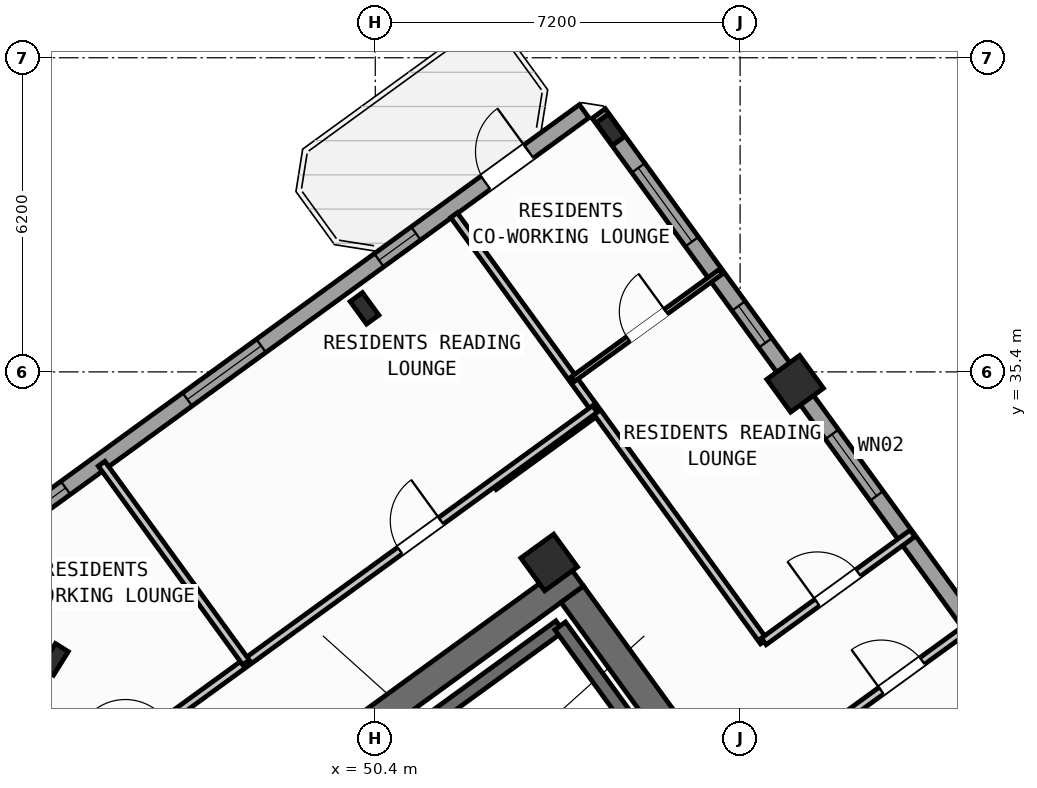
"""IFC4 building model, lengths in metres.
Left out: names, types, materials, properties, quantities, classifications, styles, units other than length and angle.
Written with IfcOpenShell. Run it as: python <this file> out.ifc"""

import sys

from ifc_helpers import new_model, si_unit, direction, frame, frame_2d, origin, origin_2d, place, context, subcontext, project, spatial, rectangle, hollow_rectangle, i_section, extrude, source, transform, mapped, element, fill, save


model = new_model("IFC4")
c1 = context("Model", 3, precision=1e-05, world=origin(), true_north=direction((0.0, 1.0)))
c2 = subcontext(c1, "Body", "Model", "MODEL_VIEW")
j1 = project(units=[si_unit("LENGTHUNIT", "METRE"), si_unit("PLANEANGLEUNIT", "RADIAN")], contexts=[c1])
p1 = place(None, origin())
s1 = spatial("IfcSite", under=j1, at=p1, CompositionType="ELEMENT")
p2 = place(p1, origin())
s2 = spatial("IfcBuilding", under=s1, at=p2, CompositionType="ELEMENT")
p3 = place(p2, frame((0.0, 0.0, 191.4)))
s3 = spatial("IfcBuildingStorey", under=s2, at=p3, CompositionType="ELEMENT", Elevation=191.4)
p4 = place(p3, frame((44.365, 24.142, 0.0), z_axis=(0.0, 0.0, 1.0), x_axis=(0.809024304885, 0.587775190107, 0.0)))
e1 = element("IfcWall", 1, at=p4, inside=s3, PredefinedType="SHEAR", context=c2, shape_type="SweptSolid", body=[
    extrude(rectangle(XDim=12.34, YDim=0.55, at=frame_2d((6.17, 0.0))), origin(), (0.0, 0.0, 1.0), 3.32),
])
p5 = place(p3, frame((58.064, 25.813, 0.0), z_axis=(0.0, 0.0, 1.0), x_axis=(-0.587764933797, 0.809031756236, 0.0)))
e2 = element("IfcWall", 2, at=p5, inside=s3, PredefinedType="SHEAR", context=c2, shape_type="SweptSolid", body=[
    extrude(rectangle(XDim=6.425, YDim=0.55, at=frame_2d((3.212, 0.0))), origin(), (0.0, 0.0, 1.0), 3.32),
])
m1 = source(origin(), c2, "Body", "SweptSolid", [
    extrude(i_section(OverallWidth=0.3, OverallDepth=0.55, WebThickness=0.015, FlangeThickness=0.029, at=origin_2d()), origin(), (0.0, 0.0, 1.0), 3.6),
])
p6 = place(p3, frame((44.068, 29.726, 0.0), z_axis=(0.0, 0.0, 1.0), x_axis=(-0.848048096156, 0.529919264233, 0.0)))
e3 = element("IfcColumn", 3, at=p6, inside=s3, PredefinedType="COLUMN", context=c2, shape_type="MappedRepresentation", body=[
    mapped(m1, transform((0.0, 0.0, 0.0), scale=1.0)),
])
m2 = source(origin(), c2, "Body", "SweptSolid", [
    extrude(hollow_rectangle(XDim=0.8, YDim=0.8, WallThickness=0.032, at=origin_2d()), origin(), (0.0, 0.0, 1.0), 3.6),
])
p7 = place(p3, frame((53.832, 31.638, 0.0), z_axis=(0.0, 0.0, 1.0), x_axis=(0.809016994375, 0.587785252292, 0.0)))
e4 = element("IfcColumn", 4, at=p7, inside=s3, PredefinedType="COLUMN", context=c2, shape_type="MappedRepresentation", body=[
    mapped(m2, transform((0.0, 0.0, 0.0), scale=1.0)),
])
p8 = place(p3, frame((50.188, 36.654, 0.0), z_axis=(0.0, 0.0, 1.0), x_axis=(0.809016994375, 0.587785252292, 0.0)))
e5 = element("IfcColumn", 5, at=p8, inside=s3, PredefinedType="COLUMN", context=c2, shape_type="MappedRepresentation", body=[
    mapped(m1, transform((0.0, 0.0, 0.0), scale=1.0)),
])
p9 = place(p3, frame((58.686, 35.165, 0.0), z_axis=(0.0, 0.0, 1.0), x_axis=(0.809016994375, 0.587785252292, 0.0)))
e6 = element("IfcColumn", 6, at=p9, inside=s3, PredefinedType="COLUMN", context=c2, shape_type="MappedRepresentation", body=[
    mapped(m2, transform((0.0, 0.0, 0.0), scale=1.0)),
])
p10 = place(p3, frame((55.042, 40.181, 0.0), z_axis=(0.0, 0.0, 1.0), x_axis=(0.809016994375, 0.587785252292, 0.0)))
e7 = element("IfcColumn", 7, at=p10, inside=s3, PredefinedType="COLUMN", context=c2, shape_type="MappedRepresentation", body=[
    mapped(m1, transform((0.0, 0.0, 0.0), scale=1.0)),
])
p11 = place(p3, frame((42.207, 31.597, 0.0), z_axis=(0.0, 0.0, 1.0), x_axis=(0.809020333377, 0.587780656523, 0.0)))
e8 = element("IfcWall", 8, at=p11, inside=s3, PredefinedType="STANDARD", context=c2, shape_type="SweptSolid", body=[
    extrude(rectangle(XDim=15.223, YDim=0.32, at=frame_2d((7.611, 0.0))), origin(), (0.0, 0.0, 1.0), 3.32),
])
p12 = place(p11, frame((12.82, 0.0, 0.0)))
e9 = element("IfcOpeningElement", 9, at=p12, cuts=e8, PredefinedType="OPENING", context=c2, shape_type="SweptSolid", body=[
    extrude(rectangle(XDim=1.05, YDim=2.15, at=frame_2d((0.525, 1.075))), frame((0.0, 0.17, 0.0), z_axis=(0.0, -1.0, 0.0), x_axis=(1.0, 0.0, 0.0)), (0.0, 0.0, 1.0), 0.34),
])
p13 = place(p11, frame((0.775, 0.0, 0.85)))
e10 = element("IfcOpeningElement", 10, at=p13, cuts=e8, PredefinedType="OPENING", context=c2, shape_type="SweptSolid", body=[
    extrude(rectangle(XDim=1.8, YDim=1.5, at=frame_2d((0.9, 0.75))), frame((0.0, 0.17, 0.0), z_axis=(0.0, -1.0, 0.0), x_axis=(1.0, 0.0, 0.0)), (0.0, 0.0, 1.0), 0.34),
])
p14 = place(p11, frame((5.544, 0.0, 0.85)))
e11 = element("IfcOpeningElement", 11, at=p14, cuts=e8, PredefinedType="OPENING", context=c2, shape_type="SweptSolid", body=[
    extrude(rectangle(XDim=1.8, YDim=1.5, at=frame_2d((0.9, 0.75))), frame((0.0, 0.17, 0.0), z_axis=(0.0, -1.0, 0.0), x_axis=(1.0, 0.0, 0.0)), (0.0, 0.0, 1.0), 0.34),
])
p15 = place(p11, frame((10.219, 0.0, 1.0)))
e12 = element("IfcOpeningElement", 12, at=p15, cuts=e8, PredefinedType="OPENING", context=c2, shape_type="SweptSolid", body=[
    extrude(rectangle(XDim=0.9, YDim=1.25, at=frame_2d((0.45, 0.625))), frame((0.0, 0.17, 0.0), z_axis=(0.0, -1.0, 0.0), x_axis=(1.0, 0.0, 0.0)), (0.0, 0.0, 1.0), 0.34),
])
p16 = place(p3, frame((54.81, 40.5, 0.0), z_axis=(0.0, 0.0, 1.0), x_axis=(0.587783625747, -0.809018176127, 0.0)))
e13 = element("IfcWall", 13, at=p16, inside=s3, PredefinedType="STANDARD", context=c2, shape_type="SweptSolid", body=[
    extrude(rectangle(XDim=21.587, YDim=0.32, at=frame_2d((10.794, 0.0))), origin(), (0.0, 0.0, 1.0), 2.795),
])
p17 = place(p16, frame((1.328, 0.0, 0.85)))
e14 = element("IfcOpeningElement", 14, at=p17, cuts=e13, PredefinedType="OPENING", context=c2, shape_type="SweptSolid", body=[
    extrude(rectangle(XDim=1.8, YDim=1.5, at=frame_2d((0.9, 0.75))), frame((0.0, 0.17, 0.0), z_axis=(0.0, -1.0, 0.0), x_axis=(1.0, 0.0, 0.0)), (0.0, 0.0, 1.0), 0.34),
])
p18 = place(p16, frame((4.695, 0.0, 1.0)))
e15 = element("IfcOpeningElement", 15, at=p18, cuts=e13, PredefinedType="OPENING", context=c2, shape_type="SweptSolid", body=[
    extrude(rectangle(XDim=0.9, YDim=1.25, at=frame_2d((0.45, 0.625))), frame((0.0, 0.17, 0.0), z_axis=(0.0, -1.0, 0.0), x_axis=(1.0, 0.0, 0.0)), (0.0, 0.0, 1.0), 0.34),
])
p19 = place(p16, frame((7.829, 0.0, 0.85)))
e16 = element("IfcOpeningElement", 16, at=p19, cuts=e13, PredefinedType="OPENING", context=c2, shape_type="SweptSolid", body=[
    extrude(rectangle(XDim=1.5, YDim=1.5, at=frame_2d((0.75, 0.75))), frame((0.0, 0.17, 0.0), z_axis=(0.0, -1.0, 0.0), x_axis=(1.0, 0.0, 0.0)), (0.0, 0.0, 1.0), 0.34),
])
p20 = place(p16, frame((15.542, 0.0, 0.95)))
e17 = element("IfcOpeningElement", 17, at=p20, cuts=e13, PredefinedType="OPENING", context=c2, shape_type="SweptSolid", body=[
    extrude(rectangle(XDim=1.2, YDim=1.4, at=frame_2d((0.6, 0.7))), frame((0.0, 0.17, 0.0), z_axis=(0.0, -1.0, 0.0), x_axis=(1.0, 0.0, 0.0)), (0.0, 0.0, 1.0), 0.34),
])
p21 = place(p16, frame((19.097, 0.0, 1.0)))
e18 = element("IfcOpeningElement", 18, at=p21, cuts=e13, PredefinedType="OPENING", context=c2, shape_type="SweptSolid", body=[
    extrude(rectangle(XDim=0.9, YDim=1.25, at=frame_2d((0.45, 0.625))), frame((0.0, 0.17, 0.0), z_axis=(0.0, -1.0, 0.0), x_axis=(1.0, 0.0, 0.0)), (0.0, 0.0, 1.0), 0.34),
])
p22 = place(p3, frame((48.006, 25.996, 0.0), z_axis=(0.0, 0.0, 1.0), x_axis=(0.80901903764, 0.587782439969, 0.0)))
e19 = element("IfcWall", 19, at=p22, inside=s3, PredefinedType="SHEAR", context=c2, shape_type="SweptSolid", body=[
    extrude(rectangle(XDim=7.46, YDim=0.26, at=frame_2d((3.73, 0.0))), origin(), (0.0, 0.0, 1.0), 3.32),
])
p23 = place(p3, frame((55.906, 27.831, 0.0), z_axis=(0.0, 0.0, 1.0), x_axis=(-0.587804123638, 0.809003283204, 0.0)))
e20 = element("IfcWall", 20, at=p23, inside=s3, PredefinedType="SHEAR", context=c2, shape_type="SweptSolid", body=[
    extrude(rectangle(XDim=3.16, YDim=0.26, at=frame_2d((1.58, 0.0))), origin(), (0.0, 0.0, 1.0), 3.32),
])
p24 = place(p3, frame((52.739, 33.143, 0.0), z_axis=(0.0, 0.0, 1.0), x_axis=(0.809000999347, 0.58780726693, 0.0)))
e21 = element("IfcWall", 21, at=p24, inside=s3, PredefinedType="PARTITIONING", context=c2, shape_type="SweptSolid", body=[
    extrude(rectangle(XDim=2.51, YDim=0.16, at=frame_2d((1.255, 0.0))), origin(), (0.0, 0.0, 1.0), 3.31),
])
p25 = place(p3, frame((58.067, 30.08, 0.0), z_axis=(0.0, 0.0, 1.0), x_axis=(-0.587787785243, 0.809015154073, 0.0)))
e22 = element("IfcWall", 22, at=p25, inside=s3, PredefinedType="PARTITIONING", context=c2, shape_type="SweptSolid", body=[
    extrude(rectangle(XDim=10.4, YDim=0.16, at=frame_2d((5.2, 0.0))), origin(), (0.0, 0.0, 1.0), 3.31),
])
p26 = place(p3, frame((59.331, 28.341, 0.0), z_axis=(0.0, 0.0, 1.0), x_axis=(0.809003564202, 0.587803736896, 0.0)))
e23 = element("IfcWall", 23, at=p26, inside=s3, PredefinedType="PARTITIONING", context=c2, shape_type="SweptSolid", body=[
    extrude(rectangle(XDim=3.63, YDim=0.16, at=frame_2d((1.815, 0.0))), origin(), (0.0, 0.0, 1.0), 3.31),
])
p27 = place(p26, frame((1.305, 0.0, 0.0)))
e24 = element("IfcOpeningElement", 24, at=p27, cuts=e23, PredefinedType="OPENING", context=c2, shape_type="SweptSolid", body=[
    extrude(rectangle(XDim=1.0, YDim=2.1, at=frame_2d((0.5, 1.05))), frame((0.0, 0.09, 0.0), z_axis=(0.0, -1.0, 0.0), x_axis=(1.0, 0.0, 0.0)), (0.0, 0.0, 1.0), 0.18),
])
p28 = place(p3, frame((58.067, 30.08, 0.0), z_axis=(0.0, 0.0, 1.0), x_axis=(0.809012309495, 0.587791700422, 0.0)))
e25 = element("IfcWall", 25, at=p28, inside=s3, PredefinedType="PARTITIONING", context=c2, shape_type="SweptSolid", body=[
    extrude(rectangle(XDim=3.63, YDim=0.16, at=frame_2d((1.815, 0.0))), origin(), (0.0, 0.0, 1.0), 3.31),
])
p29 = place(p28, frame((1.305, 0.0, 0.0)))
e26 = element("IfcOpeningElement", 26, at=p29, cuts=e25, PredefinedType="OPENING", context=c2, shape_type="SweptSolid", body=[
    extrude(rectangle(XDim=1.0, YDim=2.1, at=frame_2d((0.5, 1.05))), frame((0.0, 0.09, 0.0), z_axis=(0.0, -1.0, 0.0), x_axis=(1.0, 0.0, 0.0)), (0.0, 0.0, 1.0), 0.18),
])
p30 = place(p3, frame((54.304, 35.259, 0.0), z_axis=(0.0, 0.0, 1.0), x_axis=(0.809005039917, 0.58780170584, 0.0)))
e27 = element("IfcWall", 27, at=p30, inside=s3, PredefinedType="PARTITIONING", context=c2, shape_type="SweptSolid", body=[
    extrude(rectangle(XDim=3.61, YDim=0.11, at=frame_2d((1.805, 0.0))), origin(), (0.0, 0.0, 1.0), 3.31),
])
p31 = place(p30, frame((1.345, 0.0, 0.0)))
e28 = element("IfcOpeningElement", 28, at=p31, cuts=e27, PredefinedType="OPENING", context=c2, shape_type="SweptSolid", body=[
    extrude(rectangle(XDim=0.92, YDim=2.08, at=frame_2d((0.46, 1.04))), frame((0.0, 0.065, 0.0), z_axis=(0.0, -1.0, 0.0), x_axis=(1.0, 0.0, 0.0)), (0.0, 0.0, 1.0), 0.13),
])
p32 = place(p3, frame((42.866, 26.044, 0.0), z_axis=(0.0, 0.0, 1.0), x_axis=(0.809020254154, 0.587780765566, 0.0)))
e29 = element("IfcWall", 29, at=p32, inside=s3, PredefinedType="PARTITIONING", context=c2, shape_type="SweptSolid", body=[
    extrude(rectangle(XDim=14.67, YDim=0.16, at=frame_2d((7.335, 0.0))), origin(), (0.0, 0.0, 1.0), 3.31),
])
p33 = place(p32, frame((3.215, 0.0, 0.0)))
e30 = element("IfcOpeningElement", 30, at=p33, cuts=e29, PredefinedType="OPENING", context=c2, shape_type="SweptSolid", body=[
    extrude(rectangle(XDim=1.0, YDim=2.1, at=frame_2d((0.5, 1.05))), frame((0.0, 0.09, 0.0), z_axis=(0.0, -1.0, 0.0), x_axis=(1.0, 0.0, 0.0)), (0.0, 0.0, 1.0), 0.18),
])
p34 = place(p32, frame((9.915, 0.0, 0.0)))
e31 = element("IfcOpeningElement", 31, at=p34, cuts=e29, PredefinedType="OPENING", context=c2, shape_type="SweptSolid", body=[
    extrude(rectangle(XDim=1.0, YDim=2.1, at=frame_2d((0.5, 1.05))), frame((0.0, 0.09, 0.0), z_axis=(0.0, -1.0, 0.0), x_axis=(1.0, 0.0, 0.0)), (0.0, 0.0, 1.0), 0.18),
])
p35 = place(p3, frame((43.969, 26.55, 0.0), z_axis=(0.0, 0.0, 1.0), x_axis=(-0.587776919386, 0.80902304852, 0.0)))
e32 = element("IfcWall", 32, at=p35, inside=s3, PredefinedType="PARTITIONING", context=c2, shape_type="SweptSolid", body=[
    extrude(rectangle(XDim=5.48, YDim=0.16, at=frame_2d((2.74, 0.0))), origin(), (0.0, 0.0, 1.0), 3.31),
])
p36 = place(p3, frame((47.849, 29.665, 0.0), z_axis=(0.0, 0.0, 1.0), x_axis=(-0.587785532001, 0.809016791155, 0.0)))
e33 = element("IfcWall", 33, at=p36, inside=s3, PredefinedType="PARTITIONING", context=c2, shape_type="SweptSolid", body=[
    extrude(rectangle(XDim=4.85, YDim=0.16, at=frame_2d((2.425, 0.0))), origin(), (0.0, 0.0, 1.0), 3.31),
])
m3 = source(origin(), c2, "Body", "SweptSolid", [
    extrude(rectangle(XDim=1.05, YDim=2.15, at=frame_2d((0.525, 1.075))), frame((0.0, 0.025, 0.0), z_axis=(0.0, -1.0, 0.0), x_axis=(1.0, 0.0, 0.0)), (0.0, 0.0, 1.0), 0.05),
])
p37 = place(p12, origin())
e34 = element("IfcDoor", 34, at=p37, inside=s3, OperationType="SINGLE_SWING_RIGHT", PredefinedType="DOOR", context=c2, shape_type="MappedRepresentation", body=[
    mapped(m3, transform((0.0, 0.0, 0.0), scale=1.0)),
])
fill(e9, e34)
m4 = source(origin(), c2, "Body", "SweptSolid", [
    extrude(rectangle(XDim=1.8, YDim=1.5, at=frame_2d((0.9, 0.75))), frame((0.0, 0.03, 0.0), z_axis=(0.0, -1.0, 0.0), x_axis=(1.0, 0.0, 0.0)), (0.0, 0.0, 1.0), 0.06),
])
p38 = place(p13, origin())
e35 = element("IfcWindow", 35, at=p38, inside=s3, PartitioningType="SINGLE_PANEL", PredefinedType="WINDOW", context=c2, shape_type="MappedRepresentation", body=[
    mapped(m4, transform((0.0, 0.0, 0.0), scale=1.0)),
])
fill(e10, e35)
p39 = place(p14, origin())
e36 = element("IfcWindow", 36, at=p39, inside=s3, PartitioningType="SINGLE_PANEL", PredefinedType="WINDOW", context=c2, shape_type="MappedRepresentation", body=[
    mapped(m4, transform((0.0, 0.0, 0.0), scale=1.0)),
])
fill(e11, e36)
m5 = source(origin(), c2, "Body", "SweptSolid", [
    extrude(rectangle(XDim=0.9, YDim=1.25, at=frame_2d((0.45, 0.625))), frame((0.0, 0.03, 0.0), z_axis=(0.0, -1.0, 0.0), x_axis=(1.0, 0.0, 0.0)), (0.0, 0.0, 1.0), 0.06),
])
p40 = place(p15, origin())
e37 = element("IfcWindow", 37, at=p40, inside=s3, PartitioningType="SINGLE_PANEL", PredefinedType="WINDOW", context=c2, shape_type="MappedRepresentation", body=[
    mapped(m5, transform((0.0, 0.0, 0.0), scale=1.0)),
])
fill(e12, e37)
p41 = place(p17, origin())
e38 = element("IfcWindow", 38, at=p41, inside=s3, PartitioningType="SINGLE_PANEL", PredefinedType="WINDOW", context=c2, shape_type="MappedRepresentation", body=[
    mapped(m4, transform((0.0, 0.0, 0.0), scale=1.0)),
])
fill(e14, e38)
p42 = place(p18, origin())
e39 = element("IfcWindow", 39, at=p42, inside=s3, PartitioningType="SINGLE_PANEL", PredefinedType="WINDOW", context=c2, shape_type="MappedRepresentation", body=[
    mapped(m5, transform((0.0, 0.0, 0.0), scale=1.0)),
])
fill(e15, e39)
m6 = source(origin(), c2, "Body", "SweptSolid", [
    extrude(rectangle(XDim=1.5, YDim=1.5, at=frame_2d((0.75, 0.75))), frame((0.0, 0.03, 0.0), z_axis=(0.0, -1.0, 0.0), x_axis=(1.0, 0.0, 0.0)), (0.0, 0.0, 1.0), 0.06),
])
p43 = place(p19, origin())
e40 = element("IfcWindow", 40, at=p43, inside=s3, PartitioningType="SINGLE_PANEL", PredefinedType="WINDOW", context=c2, shape_type="MappedRepresentation", body=[
    mapped(m6, transform((0.0, 0.0, 0.0), scale=1.0)),
])
fill(e16, e40)
m7 = source(origin(), c2, "Body", "SweptSolid", [
    extrude(rectangle(XDim=1.0, YDim=2.1, at=frame_2d((0.5, 1.05))), frame((0.0, 0.025, 0.0), z_axis=(0.0, -1.0, 0.0), x_axis=(1.0, 0.0, 0.0)), (0.0, 0.0, 1.0), 0.05),
])
p44 = place(p29, origin())
e41 = element("IfcDoor", 41, at=p44, inside=s3, OperationType="SINGLE_SWING_LEFT", PredefinedType="DOOR", context=c2, shape_type="MappedRepresentation", body=[
    mapped(m7, transform((0.0, 0.0, 0.0), scale=1.0)),
])
fill(e26, e41)
m8 = source(origin(), c2, "Body", "SweptSolid", [
    extrude(rectangle(XDim=0.92, YDim=2.08, at=frame_2d((0.46, 1.04))), frame((0.0, 0.025, 0.0), z_axis=(0.0, -1.0, 0.0), x_axis=(1.0, 0.0, 0.0)), (0.0, 0.0, 1.0), 0.05),
])
p45 = place(p31, origin())
e42 = element("IfcDoor", 42, at=p45, inside=s3, OperationType="SINGLE_SWING_RIGHT", PredefinedType="DOOR", context=c2, shape_type="MappedRepresentation", body=[
    mapped(m8, transform((0.0, 0.0, 0.0), scale=1.0)),
])
fill(e28, e42)
p46 = place(p27, origin())
e43 = element("IfcDoor", 43, at=p46, inside=s3, OperationType="SINGLE_SWING_LEFT", PredefinedType="DOOR", context=c2, shape_type="MappedRepresentation", body=[
    mapped(m7, transform((0.0, 0.0, 0.0), scale=1.0)),
])
fill(e24, e43)
p47 = place(p34, origin())
e44 = element("IfcDoor", 44, at=p47, inside=s3, OperationType="SINGLE_SWING_RIGHT", PredefinedType="DOOR", context=c2, shape_type="MappedRepresentation", body=[
    mapped(m7, transform((0.0, 0.0, 0.0), scale=1.0)),
])
fill(e31, e44)
save(model, sys.argv[1])
